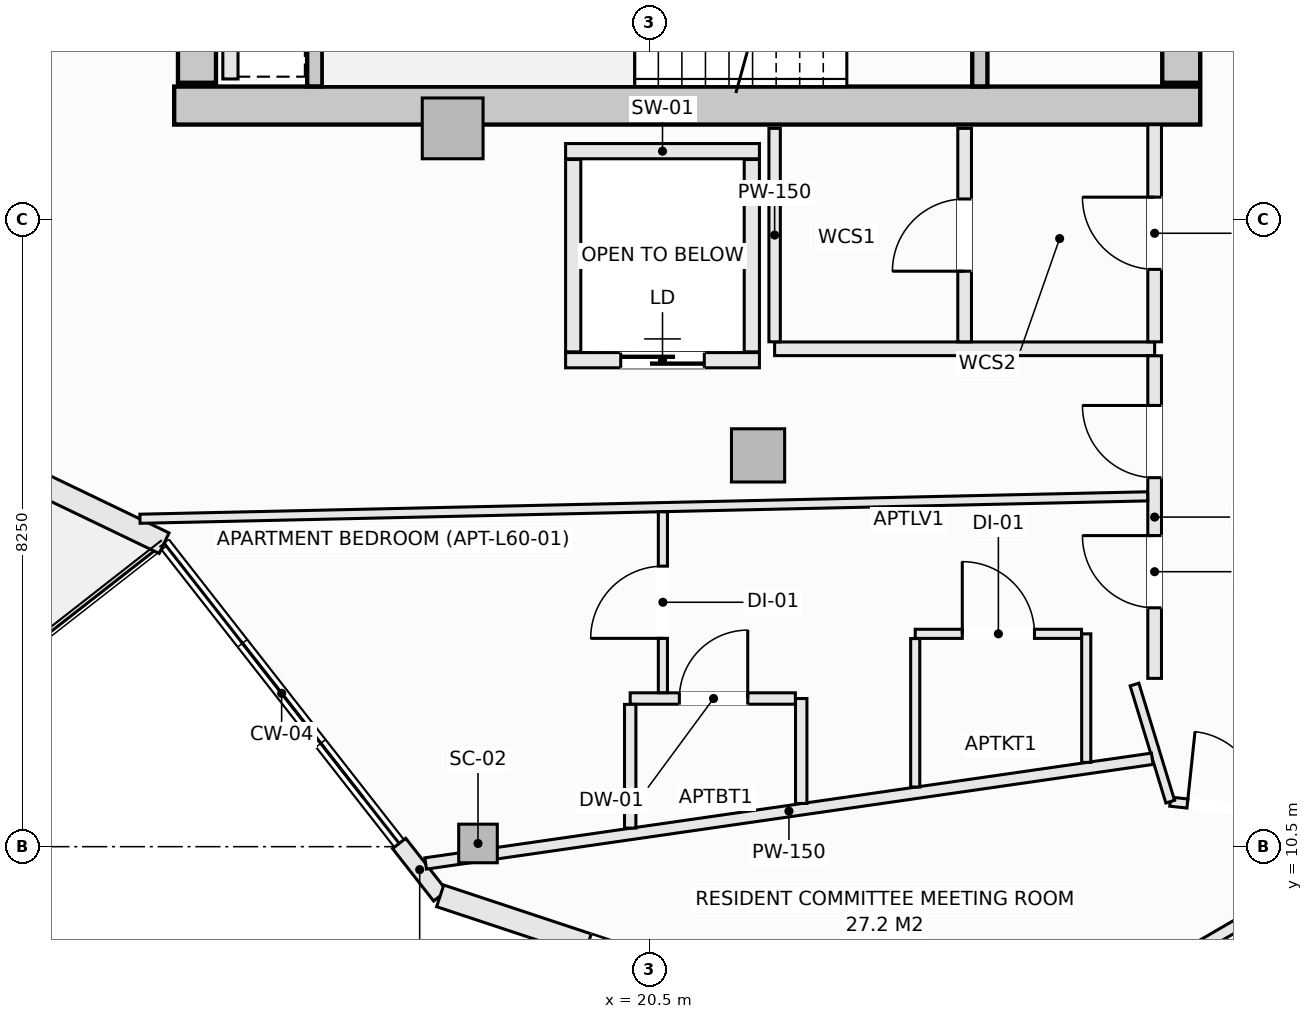
"""IFC4 building model, lengths in metres.
Left out: names, types, materials, properties, quantities, classifications, styles, units other than length and angle.
Written with IfcOpenShell. Run it as: python <this file> out.ifc"""

import sys

from ifc_helpers import new_model, si_unit, direction, frame, frame_2d, origin, origin_2d, place, context, subcontext, project, spatial, rectangle, hollow_rectangle, extrude, element, fill, save


model = new_model("IFC4")
c1 = context("Model", 3, precision=1e-05, world=origin(), true_north=direction((0.0, 1.0)))
c2 = subcontext(c1, "Body", "Model", "MODEL_VIEW")
j1 = project(units=[si_unit("LENGTHUNIT", "METRE"), si_unit("PLANEANGLEUNIT", "RADIAN")], contexts=[c1])
p1 = place(None, origin())
s1 = spatial("IfcSite", under=j1, at=p1, CompositionType="ELEMENT")
p2 = place(p1, origin())
s2 = spatial("IfcBuilding", under=s1, at=p2, CompositionType="ELEMENT")
p3 = place(p2, frame((0.0, 0.0, 226.1)))
s3 = spatial("IfcBuildingStorey", under=s2, at=p3, CompositionType="ELEMENT", Elevation=226.1)
p4 = place(p3, frame((14.25, 20.25, -0.27), z_axis=(0.0, 0.0, 1.0), x_axis=(1.0, 0.0, 0.0)))
e1 = element("IfcWall", 1, at=p4, inside=s3, PredefinedType="SHEAR", context=c2, shape_type="SweptSolid", body=[
    extrude(rectangle(XDim=13.5, YDim=0.5, at=frame_2d((6.75, 0.0))), origin(), (0.0, 0.0, 1.0), 3.3),
])
p5 = place(p3, frame((14.55, 20.55, -0.27), z_axis=(0.0, 0.0, 1.0), x_axis=(0.0, 1.0, 0.0)))
e2 = element("IfcWall", 2, at=p5, inside=s3, PredefinedType="SHEAR", context=c2, shape_type="SweptSolid", body=[
    extrude(rectangle(XDim=12.9, YDim=0.5, at=frame_2d((6.45, 0.0))), origin(), (0.0, 0.0, 1.0), 3.3),
])
p6 = place(p3, frame((27.5, 20.55, -0.27), z_axis=(0.0, 0.0, 1.0), x_axis=(0.0, 1.0, 0.0)))
e3 = element("IfcWall", 3, at=p6, inside=s3, PredefinedType="SHEAR", context=c2, shape_type="SweptSolid", body=[
    extrude(rectangle(XDim=1.5, YDim=0.5, at=frame_2d((0.75, 0.0))), origin(), (0.0, 0.0, 1.0), 3.3),
])
p7 = place(p3, frame((18.247, 10.542, -0.27), z_axis=(0.0, 0.0, 1.0), x_axis=(1.0, 0.0, 0.0)))
e4 = element("IfcColumn", 4, at=p7, inside=s3, PredefinedType="COLUMN", context=c2, shape_type="SweptSolid", body=[
    extrude(hollow_rectangle(XDim=0.508, YDim=0.508, WallThickness=0.019, at=origin_2d()), origin(), (0.0, 0.0, 1.0), 3.3),
])
p8 = place(p3, frame((21.932, 15.648, -0.27), z_axis=(0.0, 0.0, 1.0), x_axis=(1.0, 0.0, 0.0)))
e5 = element("IfcColumn", 5, at=p8, inside=s3, PredefinedType="COLUMN", context=c2, shape_type="SweptSolid", body=[
    extrude(rectangle(XDim=0.7, YDim=0.7, at=origin_2d()), origin(), (0.0, 0.0, 1.0), 3.3),
])
p9 = place(p3, frame((17.914, 19.95, -0.27), z_axis=(0.0, 0.0, 1.0), x_axis=(1.0, 0.0, 0.0)))
e6 = element("IfcColumn", 6, at=p9, inside=s3, PredefinedType="PILASTER", context=c2, shape_type="SweptSolid", body=[
    extrude(rectangle(XDim=0.8, YDim=0.8, at=origin_2d()), origin(), (0.0, 0.0, 1.0), 3.3),
])
p10 = place(p3, frame((8.691, 17.1, 0.0), z_axis=(0.0, 0.0, 1.0), x_axis=(0.901348331142, -0.433094892545, 0.0)))
e7 = element("IfcWall", 7, at=p10, inside=s3, PredefinedType="SOLIDWALL", context=c2, shape_type="SweptSolid", body=[
    extrude(rectangle(XDim=6.021, YDim=0.3, at=frame_2d((3.01, 0.0))), origin(), (0.0, 0.0, 1.0), 2.605),
])
p11 = place(p10, frame((1.91, 0.0, 0.72)))
e8 = element("IfcOpeningElement", 8, at=p11, cuts=e7, PredefinedType="OPENING", context=c2, shape_type="SweptSolid", body=[
    extrude(rectangle(XDim=2.2, YDim=1.65, at=frame_2d((1.1, 0.825))), frame((0.0, 0.16, 0.0), z_axis=(0.0, -1.0, 0.0), x_axis=(1.0, 0.0, 0.0)), (0.0, 0.0, 1.0), 0.32),
])
p12 = place(p3, frame((17.21, 10.542, 0.0), z_axis=(0.0, 0.0, 1.0), x_axis=(0.616466126167, -0.787381429352, 0.0)))
e9 = element("IfcWall", 9, at=p12, inside=s3, PredefinedType="SOLIDWALL", context=c2, shape_type="SweptSolid", body=[
    extrude(rectangle(XDim=0.876, YDim=0.22, at=frame_2d((0.438, 0.0))), origin(), (0.0, 0.0, 1.0), 2.605),
])
p13 = place(p3, frame((17.75, 9.853, 0.0), z_axis=(0.0, 0.0, 1.0), x_axis=(0.949240877604, -0.314550085495, 0.0)))
e10 = element("IfcWall", 10, at=p13, inside=s3, PredefinedType="SOLIDWALL", context=c2, shape_type="SweptSolid", body=[
    extrude(rectangle(XDim=6.288, YDim=0.3, at=frame_2d((3.144, 0.0))), origin(), (0.0, 0.0, 1.0), 2.605),
])
p14 = place(p13, frame((2.044, 0.0, 0.72)))
e11 = element("IfcOpeningElement", 11, at=p14, cuts=e10, PredefinedType="OPENING", context=c2, shape_type="SweptSolid", body=[
    extrude(rectangle(XDim=2.2, YDim=1.65, at=frame_2d((1.1, 0.825))), frame((0.0, 0.16, 0.0), z_axis=(0.0, -1.0, 0.0), x_axis=(1.0, 0.0, 0.0)), (0.0, 0.0, 1.0), 0.32),
])
p15 = place(p3, frame((24.85, 20.502, -0.27), z_axis=(0.0, 0.0, 1.0), x_axis=(0.0, 1.0, 0.0)))
e12 = element("IfcWall", 12, at=p15, inside=s3, PredefinedType="SHEAR", context=c2, shape_type="SweptSolid", body=[
    extrude(rectangle(XDim=3.038, YDim=0.2, at=frame_2d((1.519, 0.0))), origin(), (0.0, 0.0, 1.0), 3.3),
])
p16 = place(p15, frame((0.969, 0.0, 0.27)))
e13 = element("IfcOpeningElement", 13, at=p16, cuts=e12, PredefinedType="OPENING", context=c2, shape_type="SweptSolid", body=[
    extrude(rectangle(XDim=1.1, YDim=2.15, at=frame_2d((0.55, 1.075))), frame((0.0, 0.11, 0.0), z_axis=(0.0, -1.0, 0.0), x_axis=(1.0, 0.0, 0.0)), (0.0, 0.0, 1.0), 0.22),
])
p17 = place(p3, frame((16.1, 20.502, -0.27), z_axis=(0.0, 0.0, 1.0), x_axis=(0.0, 1.0, 0.0)))
e14 = element("IfcWall", 14, at=p17, inside=s3, PredefinedType="SHEAR", context=c2, shape_type="SweptSolid", body=[
    extrude(rectangle(XDim=3.036, YDim=0.2, at=frame_2d((1.518, 0.0))), origin(), (0.0, 0.0, 1.0), 3.3),
])
p18 = place(p3, frame((19.4, 19.65, 0.0), z_axis=(0.0, 0.0, 1.0), x_axis=(1.0, 0.0, 0.0)))
e15 = element("IfcWall", 15, at=p18, inside=s3, PredefinedType="SOLIDWALL", context=c2, shape_type="SweptSolid", body=[
    extrude(rectangle(XDim=2.55, YDim=0.2, at=frame_2d((1.275, 0.0))), origin(), (0.0, 0.0, 1.0), 3.03),
])
p19 = place(p3, frame((19.4, 16.9, 0.0), z_axis=(0.0, 0.0, 1.0), x_axis=(1.0, 0.0, 0.0)))
e16 = element("IfcWall", 16, at=p19, inside=s3, PredefinedType="SOLIDWALL", context=c2, shape_type="SweptSolid", body=[
    extrude(rectangle(XDim=2.55, YDim=0.2, at=frame_2d((1.275, 0.0))), origin(), (0.0, 0.0, 1.0), 3.03),
])
p20 = place(p19, frame((0.725, 0.0, 0.0)))
e17 = element("IfcOpeningElement", 17, at=p20, cuts=e16, PredefinedType="OPENING", context=c2, shape_type="SweptSolid", body=[
    extrude(rectangle(XDim=1.1, YDim=2.2, at=frame_2d((0.55, 1.1))), frame((0.0, 0.11, 0.0), z_axis=(0.0, -1.0, 0.0), x_axis=(1.0, 0.0, 0.0)), (0.0, 0.0, 1.0), 0.22),
])
for number, where, z_axis, x_axis in (
    (18, (19.5, 17.01, 0.0), (0.0, 0.0, 1.0), (0.0, 1.0, 0.0)),
    (19, (21.85, 17.01, 0.0), (0.0, 0.0, 1.0), (0.0, 1.0, 0.0)),
):
    element("IfcWall", number, at=place(p3, frame(where, z_axis=z_axis, x_axis=x_axis)), inside=s3, PredefinedType="SOLIDWALL", context=c2, shape_type="SweptSolid", body=[
        extrude(rectangle(XDim=2.53, YDim=0.2, at=frame_2d((1.265, 0.0))), origin(), (0.0, 0.0, 1.0), 3.03),
    ])
p21 = place(p3, frame((14.99, 20.6, 0.0), z_axis=(0.0, 0.0, 1.0), x_axis=(0.0, 1.0, 0.0)))
e20 = element("IfcWall", 20, at=p21, inside=s3, PredefinedType="SOLIDWALL", context=c2, shape_type="SweptSolid", body=[
    extrude(rectangle(XDim=2.85, YDim=0.2, at=frame_2d((1.425, 0.0))), origin(), (0.0, 0.0, 1.0), 3.03),
])
p22 = place(p3, frame((22.15, 17.05, 0.0), z_axis=(0.0, 0.0, 1.0), x_axis=(1.0, 0.0, 0.0)))
e21 = element("IfcWall", 21, at=p22, inside=s3, PredefinedType="SOLIDWALL", context=c2, shape_type="SweptSolid", body=[
    extrude(rectangle(XDim=5.0, YDim=0.18, at=frame_2d((2.5, 0.0))), origin(), (0.0, 0.0, 1.0), 3.03),
])
p23 = place(p3, frame((22.15, 17.142, 0.0), z_axis=(0.0, 0.0, 1.0), x_axis=(0.0, 1.0, 0.0)))
e22 = element("IfcWall", 22, at=p23, inside=s3, PredefinedType="PARTITIONING", context=c2, shape_type="SweptSolid", body=[
    extrude(rectangle(XDim=2.808, YDim=0.15, at=frame_2d((1.404, 0.0))), origin(), (0.0, 0.0, 1.0), 3.03),
])
p24 = place(p3, frame((24.65, 17.142, 0.0), z_axis=(0.0, 0.0, 1.0), x_axis=(0.0, 1.0, 0.0)))
e23 = element("IfcWall", 23, at=p24, inside=s3, PredefinedType="SOLIDWALL", context=c2, shape_type="SweptSolid", body=[
    extrude(rectangle(XDim=2.808, YDim=0.18, at=frame_2d((1.404, 0.0))), origin(), (0.0, 0.0, 1.0), 3.03),
])
p25 = place(p24, frame((0.929, 0.0, 0.0)))
e24 = element("IfcOpeningElement", 24, at=p25, cuts=e23, PredefinedType="OPENING", context=c2, shape_type="SweptSolid", body=[
    extrude(rectangle(XDim=0.95, YDim=2.1, at=frame_2d((0.475, 1.05))), frame((0.0, 0.1, 0.0), z_axis=(0.0, -1.0, 0.0), x_axis=(1.0, 0.0, 0.0)), (0.0, 0.0, 1.0), 0.2),
])
p26 = place(p3, frame((27.15, 12.714, 0.0), z_axis=(0.0, 0.0, 1.0), x_axis=(0.0, 1.0, 0.0)))
e25 = element("IfcWall", 25, at=p26, inside=s3, PredefinedType="SOLIDWALL", context=c2, shape_type="SweptSolid", body=[
    extrude(rectangle(XDim=4.244, YDim=0.18, at=frame_2d((2.122, 0.0))), origin(), (0.0, 0.0, 1.0), 3.03),
])
p27 = place(p26, frame((0.928, 0.0, 0.0)))
e26 = element("IfcOpeningElement", 26, at=p27, cuts=e25, PredefinedType="OPENING", context=c2, shape_type="SweptSolid", body=[
    extrude(rectangle(XDim=0.95, YDim=2.1, at=frame_2d((0.475, 1.05))), frame((0.0, 0.1, 0.0), z_axis=(0.0, -1.0, 0.0), x_axis=(1.0, 0.0, 0.0)), (0.0, 0.0, 1.0), 0.2),
])
p28 = place(p26, frame((2.64, 0.0, 0.0)))
e27 = element("IfcOpeningElement", 27, at=p28, cuts=e25, PredefinedType="OPENING", context=c2, shape_type="SweptSolid", body=[
    extrude(rectangle(XDim=0.95, YDim=2.1, at=frame_2d((0.475, 1.05))), frame((0.0, 0.1, 0.0), z_axis=(0.0, -1.0, 0.0), x_axis=(1.0, 0.0, 0.0)), (0.0, 0.0, 1.0), 0.2),
])
p29 = place(p3, frame((27.15, 17.142, 0.0), z_axis=(0.0, 0.0, 1.0), x_axis=(0.0, 1.0, 0.0)))
e28 = element("IfcWall", 28, at=p29, inside=s3, PredefinedType="SOLIDWALL", context=c2, shape_type="SweptSolid", body=[
    extrude(rectangle(XDim=2.856, YDim=0.18, at=frame_2d((1.428, 0.0))), origin(), (0.0, 0.0, 1.0), 3.03),
])
p30 = place(p29, frame((0.953, 0.0, 0.0)))
e29 = element("IfcOpeningElement", 29, at=p30, cuts=e28, PredefinedType="OPENING", context=c2, shape_type="SweptSolid", body=[
    extrude(rectangle(XDim=0.95, YDim=2.1, at=frame_2d((0.475, 1.05))), frame((0.0, 0.1, 0.0), z_axis=(0.0, -1.0, 0.0), x_axis=(1.0, 0.0, 0.0)), (0.0, 0.0, 1.0), 0.2),
])
p31 = place(p3, frame((27.355, 11.092, 0.0), z_axis=(0.0, 0.0, 1.0), x_axis=(0.994438591301, -0.105318033263, 0.0)))
e30 = element("IfcWall", 30, at=p31, inside=s3, PredefinedType="PARTITIONING", context=c2, shape_type="SweptSolid", body=[
    extrude(rectangle(XDim=1.405, YDim=0.12, at=frame_2d((0.702, 0.0))), origin(), (0.0, 0.0, 1.0), 3.03),
])
p32 = place(p31, frame((0.227, 0.0, 0.0)))
e31 = element("IfcOpeningElement", 31, at=p32, cuts=e30, PredefinedType="OPENING", context=c2, shape_type="SweptSolid", body=[
    extrude(rectangle(XDim=0.95, YDim=2.1, at=frame_2d((0.475, 1.05))), frame((0.0, 0.07, 0.0), z_axis=(0.0, -1.0, 0.0), x_axis=(1.0, 0.0, 0.0)), (0.0, 0.0, 1.0), 0.14),
])
p33 = place(p3, frame((26.885, 12.633, 0.0), z_axis=(0.0, 0.0, 1.0), x_axis=(0.291710302586, -0.956506716843, 0.0)))
e32 = element("IfcWall", 32, at=p33, inside=s3, PredefinedType="PARTITIONING", context=c2, shape_type="SweptSolid", body=[
    extrude(rectangle(XDim=1.611, YDim=0.12, at=frame_2d((0.806, 0.0))), origin(), (0.0, 0.0, 1.0), 3.03),
])
p34 = place(p3, frame((13.8, 14.814, 0.0), z_axis=(0.0, 0.0, 1.0), x_axis=(0.999752677802, 0.022239227231, 0.0)))
e33 = element("IfcWall", 33, at=p34, inside=s3, PredefinedType="PARTITIONING", context=c2, shape_type="SweptSolid", body=[
    extrude(rectangle(XDim=13.261, YDim=0.12, at=frame_2d((6.631, 0.0))), origin(), (0.0, 0.0, 1.0), 2.478),
])
p35 = place(p3, frame((17.559, 10.279, 0.0), z_axis=(0.0, 0.0, 1.0), x_axis=(0.989781460933, 0.142592635129, 0.0)))
e34 = element("IfcWall", 34, at=p35, inside=s3, PredefinedType="PARTITIONING", context=c2, shape_type="SweptSolid", body=[
    extrude(rectangle(XDim=9.658, YDim=0.15, at=frame_2d((4.829, 0.0))), origin(), (0.0, 0.0, 1.0), 2.605),
])
p36 = place(p3, frame((26.25, 11.609, 0.0), z_axis=(0.0, 0.0, 1.0), x_axis=(0.0, 1.0, 0.0)))
e35 = element("IfcWall", 35, at=p36, inside=s3, PredefinedType="PARTITIONING", context=c2, shape_type="SweptSolid", body=[
    extrude(rectangle(XDim=1.691, YDim=0.12, at=frame_2d((0.846, 0.0))), origin(), (0.0, 0.0, 1.0), 3.03),
])
p37 = place(p3, frame((24.0, 13.3, 0.0), z_axis=(0.0, 0.0, 1.0), x_axis=(1.0, 0.0, 0.0)))
e36 = element("IfcWall", 36, at=p37, inside=s3, PredefinedType="PARTITIONING", context=c2, shape_type="SweptSolid", body=[
    extrude(rectangle(XDim=2.188, YDim=0.12, at=frame_2d((1.094, 0.0))), origin(), (0.0, 0.0, 1.0), 3.03),
])
p38 = place(p37, frame((0.619, 0.0, 0.0)))
e37 = element("IfcOpeningElement", 37, at=p38, cuts=e36, PredefinedType="OPENING", context=c2, shape_type="SweptSolid", body=[
    extrude(rectangle(XDim=0.95, YDim=2.1, at=frame_2d((0.475, 1.05))), frame((0.0, 0.07, 0.0), z_axis=(0.0, -1.0, 0.0), x_axis=(1.0, 0.0, 0.0)), (0.0, 0.0, 1.0), 0.14),
])
p39 = place(p3, frame((24.0, 11.285, 0.0), z_axis=(0.0, 0.0, 1.0), x_axis=(0.0, 1.0, 0.0)))
e38 = element("IfcWall", 38, at=p39, inside=s3, PredefinedType="PARTITIONING", context=c2, shape_type="SweptSolid", body=[
    extrude(rectangle(XDim=1.953, YDim=0.12, at=frame_2d((0.977, 0.0))), origin(), (0.0, 0.0, 1.0), 3.03),
])
p40 = place(p3, frame((22.5, 11.069, 0.0), z_axis=(0.0, 0.0, 1.0), x_axis=(0.0, 1.0, 0.0)))
e39 = element("IfcWall", 39, at=p40, inside=s3, PredefinedType="PARTITIONING", context=c2, shape_type="SweptSolid", body=[
    extrude(rectangle(XDim=1.38, YDim=0.15, at=frame_2d((0.69, 0.0))), origin(), (0.0, 0.0, 1.0), 3.03),
])
p41 = place(p3, frame((20.25, 12.449, 0.0), z_axis=(0.0, 0.0, 1.0), x_axis=(1.0, 0.0, 0.0)))
e40 = element("IfcWall", 40, at=p41, inside=s3, PredefinedType="PARTITIONING", context=c2, shape_type="SweptSolid", body=[
    extrude(rectangle(XDim=2.173, YDim=0.15, at=frame_2d((1.086, 0.0))), origin(), (0.0, 0.0, 1.0), 3.03),
])
p42 = place(p41, frame((0.646, 0.0, 0.0)))
e41 = element("IfcOpeningElement", 41, at=p42, cuts=e40, PredefinedType="OPENING", context=c2, shape_type="SweptSolid", body=[
    extrude(rectangle(XDim=0.9, YDim=2.1, at=frame_2d((0.45, 1.05))), frame((0.0, 0.085, 0.0), z_axis=(0.0, -1.0, 0.0), x_axis=(1.0, 0.0, 0.0)), (0.0, 0.0, 1.0), 0.17),
])
p43 = place(p3, frame((20.68, 12.526, 0.0), z_axis=(0.0, 0.0, 1.0), x_axis=(0.0, 1.0, 0.0)))
e42 = element("IfcWall", 42, at=p43, inside=s3, PredefinedType="PARTITIONING", context=c2, shape_type="SweptSolid", body=[
    extrude(rectangle(XDim=2.379, YDim=0.12, at=frame_2d((1.189, 0.0))), origin(), (0.0, 0.0, 1.0), 2.478),
])
p44 = place(p43, frame((0.715, 0.0, 0.0)))
e43 = element("IfcOpeningElement", 43, at=p44, cuts=e42, PredefinedType="OPENING", context=c2, shape_type="SweptSolid", body=[
    extrude(rectangle(XDim=0.95, YDim=2.1, at=frame_2d((0.475, 1.05))), frame((0.0, 0.07, 0.0), z_axis=(0.0, -1.0, 0.0), x_axis=(1.0, 0.0, 0.0)), (0.0, 0.0, 1.0), 0.14),
])
p45 = place(p3, frame((20.25, 10.744, 0.0), z_axis=(0.0, 0.0, 1.0), x_axis=(0.0, 1.0, 0.0)))
e44 = element("IfcWall", 44, at=p45, inside=s3, PredefinedType="PARTITIONING", context=c2, shape_type="SweptSolid", body=[
    extrude(rectangle(XDim=1.628, YDim=0.15, at=frame_2d((0.814, 0.0))), origin(), (0.0, 0.0, 1.0), 3.03),
])
p46 = place(p3, frame((25.447, 7.846, 0.0), z_axis=(0.0, 0.0, 1.0), x_axis=(0.864279409289, 0.503012030353, 0.0)))
e45 = element("IfcWall", 45, at=p46, inside=s3, PredefinedType="PARTITIONING", context=c2, shape_type="SweptSolid", body=[
    extrude(rectangle(XDim=5.179, YDim=0.15, at=frame_2d((2.59, 0.0))), origin(), (0.0, 0.0, 1.0), 3.03),
])
p47 = place(p20, origin())
e46 = element("IfcDoor", 46, at=p47, inside=s3, OperationType="SLIDING_TO_LEFT", PredefinedType="DOOR", context=c2, shape_type="SweptSolid", body=[
    extrude(rectangle(XDim=1.1, YDim=2.2, at=frame_2d((0.55, 1.1))), frame((0.0, 0.025, 0.0), z_axis=(0.0, -1.0, 0.0), x_axis=(1.0, 0.0, 0.0)), (0.0, 0.0, 1.0), 0.05),
])
fill(e17, e46)
p48 = place(p30, origin())
e47 = element("IfcDoor", 47, at=p48, inside=s3, OperationType="SINGLE_SWING_RIGHT", PredefinedType="DOOR", context=c2, shape_type="SweptSolid", body=[
    extrude(rectangle(XDim=0.95, YDim=2.1, at=frame_2d((0.475, 1.05))), frame((0.0, 0.025, 0.0), z_axis=(0.0, -1.0, 0.0), x_axis=(1.0, 0.0, 0.0)), (0.0, 0.0, 1.0), 0.05),
])
fill(e29, e47)
p49 = place(p27, origin())
e48 = element("IfcDoor", 48, at=p49, inside=s3, OperationType="SINGLE_SWING_RIGHT", PredefinedType="DOOR", context=c2, shape_type="SweptSolid", body=[
    extrude(rectangle(XDim=0.95, YDim=2.1, at=frame_2d((0.475, 1.05))), frame((0.0, 0.025, 0.0), z_axis=(0.0, -1.0, 0.0), x_axis=(1.0, 0.0, 0.0)), (0.0, 0.0, 1.0), 0.05),
])
fill(e26, e48)
p50 = place(p32, origin())
e49 = element("IfcDoor", 49, at=p50, inside=s3, OperationType="SINGLE_SWING_LEFT", PredefinedType="DOOR", context=c2, shape_type="SweptSolid", body=[
    extrude(rectangle(XDim=0.95, YDim=2.1, at=frame_2d((0.475, 1.05))), frame((0.0, 0.025, 0.0), z_axis=(0.0, -1.0, 0.0), x_axis=(1.0, 0.0, 0.0)), (0.0, 0.0, 1.0), 0.05),
])
fill(e31, e49)
p51 = place(p28, origin())
e50 = element("IfcDoor", 50, at=p51, inside=s3, OperationType="SINGLE_SWING_RIGHT", PredefinedType="DOOR", context=c2, shape_type="SweptSolid", body=[
    extrude(rectangle(XDim=0.95, YDim=2.1, at=frame_2d((0.475, 1.05))), frame((0.0, 0.025, 0.0), z_axis=(0.0, -1.0, 0.0), x_axis=(1.0, 0.0, 0.0)), (0.0, 0.0, 1.0), 0.05),
])
fill(e27, e50)
p52 = place(p38, origin())
e51 = element("IfcDoor", 51, at=p52, inside=s3, OperationType="SINGLE_SWING_LEFT", PredefinedType="DOOR", context=c2, shape_type="SweptSolid", body=[
    extrude(rectangle(XDim=0.95, YDim=2.1, at=frame_2d((0.475, 1.05))), frame((0.0, 0.025, 0.0), z_axis=(0.0, -1.0, 0.0), x_axis=(1.0, 0.0, 0.0)), (0.0, 0.0, 1.0), 0.05),
])
fill(e37, e51)
p53 = place(p42, origin())
e52 = element("IfcDoor", 52, at=p53, inside=s3, OperationType="SINGLE_SWING_RIGHT", PredefinedType="DOOR", context=c2, shape_type="SweptSolid", body=[
    extrude(rectangle(XDim=0.9, YDim=2.1, at=frame_2d((0.45, 1.05))), frame((0.0, 0.025, 0.0), z_axis=(0.0, -1.0, 0.0), x_axis=(1.0, 0.0, 0.0)), (0.0, 0.0, 1.0), 0.05),
])
fill(e41, e52)
p54 = place(p44, origin())
e53 = element("IfcDoor", 53, at=p54, inside=s3, OperationType="SINGLE_SWING_LEFT", PredefinedType="DOOR", context=c2, shape_type="SweptSolid", body=[
    extrude(rectangle(XDim=0.95, YDim=2.1, at=frame_2d((0.475, 1.05))), frame((0.0, 0.025, 0.0), z_axis=(0.0, -1.0, 0.0), x_axis=(1.0, 0.0, 0.0)), (0.0, 0.0, 1.0), 0.05),
])
fill(e43, e53)
p55 = place(p25, origin())
e54 = element("IfcDoor", 54, at=p55, inside=s3, OperationType="SINGLE_SWING_LEFT", PredefinedType="DOOR", context=c2, shape_type="SweptSolid", body=[
    extrude(rectangle(XDim=0.95, YDim=2.1, at=frame_2d((0.475, 1.05))), frame((0.0, 0.025, 0.0), z_axis=(0.0, -1.0, 0.0), x_axis=(1.0, 0.0, 0.0)), (0.0, 0.0, 1.0), 0.05),
])
fill(e24, e54)
save(model, sys.argv[1])
